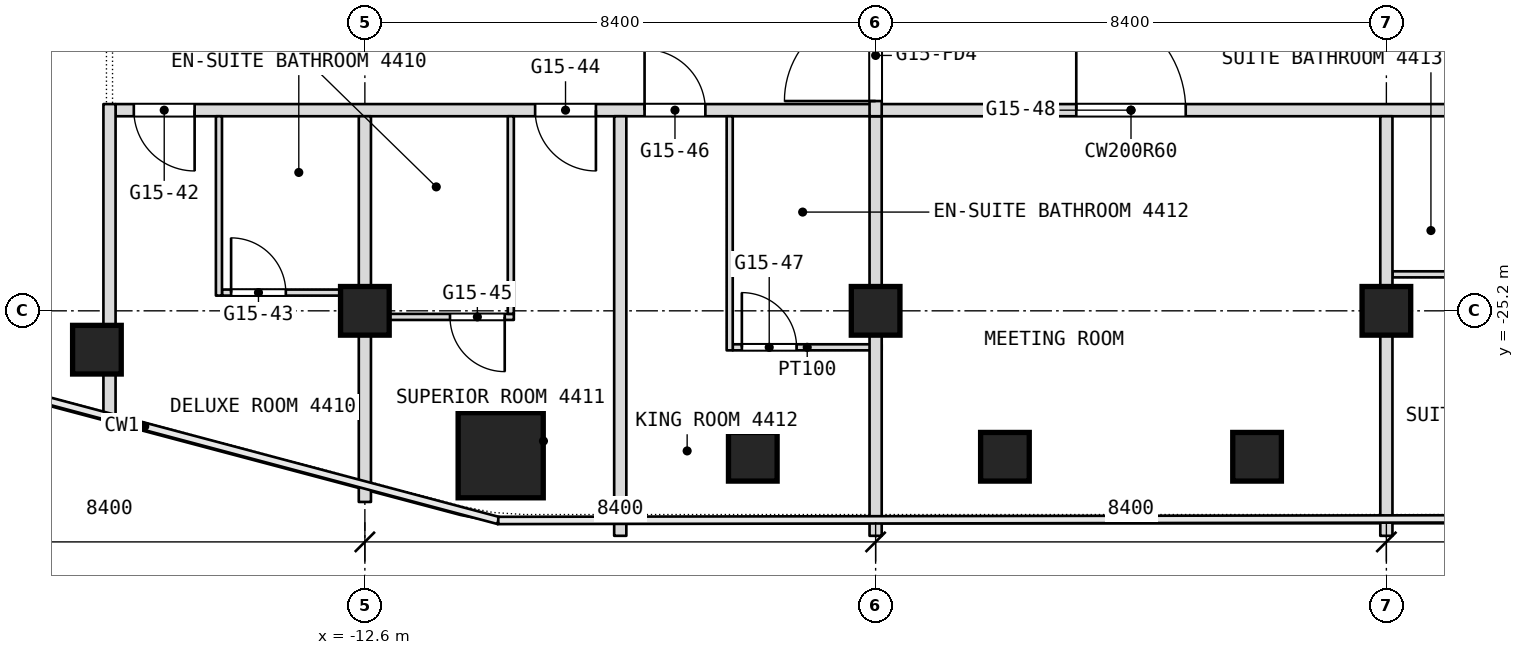
"""IFC4 building model, lengths in metres.
Left out: names, types, materials, properties, quantities, classifications, styles, units other than length and angle.
Written with IfcOpenShell. Run it as: python <this file> out.ifc"""

import sys

from ifc_helpers import new_model, si_unit, direction, frame, frame_2d, origin, origin_2d, place, context, subcontext, project, spatial, rectangle, extrude, element, fill, save


model = new_model("IFC4")
c1 = context("Model", 3, precision=1e-05, world=origin(), true_north=direction((0.0, 1.0)))
c2 = subcontext(c1, "Body", "Model", "MODEL_VIEW")
j1 = project(units=[si_unit("LENGTHUNIT", "METRE"), si_unit("PLANEANGLEUNIT", "RADIAN")], contexts=[c1])
p1 = place(None, origin())
s1 = spatial("IfcSite", under=j1, at=p1, CompositionType="ELEMENT")
p2 = place(p1, origin())
s2 = spatial("IfcBuilding", under=s1, at=p2, CompositionType="ELEMENT")
p3 = place(p2, frame((0.0, 0.0, 194.9)))
s3 = spatial("IfcBuildingStorey", under=s2, at=p3, CompositionType="ELEMENT", Elevation=194.9)
p4 = place(p3, frame((-10.366, -27.575, 0.0), z_axis=(0.0, 0.0, 1.0), x_axis=(1.0, 0.0, 0.0)))
e1 = element("IfcColumn", 1, at=p4, inside=s3, PredefinedType="COLUMN", context=c2, shape_type="SweptSolid", body=[
    extrude(rectangle(XDim=1.4, YDim=1.4, at=origin_2d()), origin(), (0.0, 0.0, 1.0), 3.6),
])
for number, where, z_axis, x_axis in (
    (2, (-12.6, -25.2, 0.0), (0.0, 0.0, 1.0), (1.0, 0.0, 0.0)),
    (3, (-4.2, -25.2, 0.0), (0.0, 0.0, 1.0), (1.0, 0.0, 0.0)),
    (4, (4.2, -25.2, 0.0), (0.0, 0.0, 1.0), (1.0, 0.0, 0.0)),
    (5, (2.073, -27.6, 0.0), (0.0, 0.0, 1.0), (1.0, 0.0, 0.0)),
    (6, (-2.073, -27.6, 0.0), (0.0, 0.0, 1.0), (1.0, 0.0, 0.0)),
    (7, (-6.22, -27.6, 0.0), (0.0, 0.0, 1.0), (1.0, 0.0, 0.0)),
    (8, (-17.007, -25.839, 0.0), (0.0, 0.0, 1.0), (1.0, 0.0, 0.0)),
):
    element("IfcColumn", number, at=place(p3, frame(where, z_axis=z_axis, x_axis=x_axis)), inside=s3, PredefinedType="COLUMN", context=c2, shape_type="SweptSolid", body=[
        extrude(rectangle(XDim=0.8, YDim=0.8, at=origin_2d()), origin(), (0.0, 0.0, 1.0), 3.6),
    ])
p5 = place(p3, frame((-6.55, -25.8, 0.0), z_axis=(0.0, 0.0, 1.0), x_axis=(1.0, 0.0, 0.0)))
e9 = element("IfcWall", 9, at=p5, inside=s3, PredefinedType="PARTITIONING", context=c2, shape_type="SweptSolid", body=[
    extrude(rectangle(XDim=2.45, YDim=0.1, at=frame_2d((1.225, 0.0))), origin(), (0.0, 0.0, 1.0), 3.34),
])
p6 = place(p5, frame((0.15, 0.0, 0.0)))
e10 = element("IfcOpeningElement", 10, at=p6, cuts=e9, PredefinedType="OPENING", context=c2, shape_type="SweptSolid", body=[
    extrude(rectangle(XDim=0.9, YDim=2.1, at=frame_2d((0.45, 1.05))), frame((0.0, 0.05, 0.0), z_axis=(0.0, -1.0, 0.0), x_axis=(1.0, 0.0, 0.0)), (0.0, 0.0, 1.0), 0.1),
])
p7 = place(p3, frame((-12.5, -25.3, 0.0), z_axis=(0.0, 0.0, 1.0), x_axis=(1.0, 0.0, 0.0)))
e11 = element("IfcWall", 11, at=p7, inside=s3, PredefinedType="PARTITIONING", context=c2, shape_type="SweptSolid", body=[
    extrude(rectangle(XDim=2.35, YDim=0.1, at=frame_2d((1.175, 0.0))), origin(), (0.0, 0.0, 1.0), 2.94),
])
p8 = place(p7, frame((1.3, 0.0, 0.0)))
e12 = element("IfcOpeningElement", 12, at=p8, cuts=e11, PredefinedType="OPENING", context=c2, shape_type="SweptSolid", body=[
    extrude(rectangle(XDim=0.9, YDim=2.1, at=frame_2d((0.45, 1.05))), frame((0.0, 0.05, 0.0), z_axis=(0.0, -1.0, 0.0), x_axis=(1.0, 0.0, 0.0)), (0.0, 0.0, 1.0), 0.1),
])
p9 = place(p3, frame((-14.95, -24.9, 0.0), z_axis=(0.0, 0.0, 1.0), x_axis=(1.0, 0.0, 0.0)))
e13 = element("IfcWall", 13, at=p9, inside=s3, PredefinedType="PARTITIONING", context=c2, shape_type="SweptSolid", body=[
    extrude(rectangle(XDim=2.45, YDim=0.1, at=frame_2d((1.225, 0.0))), origin(), (0.0, 0.0, 1.0), 3.34),
])
p10 = place(p9, frame((0.15, 0.0, 0.0)))
e14 = element("IfcOpeningElement", 14, at=p10, cuts=e13, PredefinedType="OPENING", context=c2, shape_type="SweptSolid", body=[
    extrude(rectangle(XDim=0.9, YDim=2.1, at=frame_2d((0.45, 1.05))), frame((0.0, 0.05, 0.0), z_axis=(0.0, -1.0, 0.0), x_axis=(1.0, 0.0, 0.0)), (0.0, 0.0, 1.0), 0.1),
])
p11 = place(p3, frame((4.3, -24.6, 0.0), z_axis=(0.0, 0.0, 1.0), x_axis=(1.0, 0.0, 0.0)))
e15 = element("IfcWall", 15, at=p11, inside=s3, PredefinedType="PARTITIONING", context=c2, shape_type="SweptSolid", body=[
    extrude(rectangle(XDim=2.35, YDim=0.1, at=frame_2d((1.175, 0.0))), origin(), (0.0, 0.0, 1.0), 3.34),
])
p12 = place(p3, frame((-16.7, -21.9, 0.0), z_axis=(0.0, 0.0, 1.0), x_axis=(1.0, 0.0, 0.0)))
e16 = element("IfcWall", 16, at=p12, inside=s3, PredefinedType="PARTITIONING", context=c2, shape_type="SweptSolid", body=[
    extrude(rectangle(XDim=33.4, YDim=0.2, at=frame_2d((16.7, 0.0))), origin(), (0.0, 0.0, 1.0), 3.34),
])
p13 = place(p12, frame((0.3, 0.0, 0.0)))
e17 = element("IfcOpeningElement", 17, at=p13, cuts=e16, PredefinedType="OPENING", context=c2, shape_type="SweptSolid", body=[
    extrude(rectangle(XDim=1.0, YDim=2.1, at=frame_2d((0.5, 1.05))), frame((0.0, 0.1, 0.0), z_axis=(0.0, -1.0, 0.0), x_axis=(1.0, 0.0, 0.0)), (0.0, 0.0, 1.0), 0.2),
])
p14 = place(p12, frame((6.9, 0.0, 0.0)))
e18 = element("IfcOpeningElement", 18, at=p14, cuts=e16, PredefinedType="OPENING", context=c2, shape_type="SweptSolid", body=[
    extrude(rectangle(XDim=1.0, YDim=2.1, at=frame_2d((0.5, 1.05))), frame((0.0, 0.1, 0.0), z_axis=(0.0, -1.0, 0.0), x_axis=(1.0, 0.0, 0.0)), (0.0, 0.0, 1.0), 0.2),
])
p15 = place(p12, frame((8.7, 0.0, 0.0)))
e19 = element("IfcOpeningElement", 19, at=p15, cuts=e16, PredefinedType="OPENING", context=c2, shape_type="SweptSolid", body=[
    extrude(rectangle(XDim=1.0, YDim=2.1, at=frame_2d((0.5, 1.05))), frame((0.0, 0.1, 0.0), z_axis=(0.0, -1.0, 0.0), x_axis=(1.0, 0.0, 0.0)), (0.0, 0.0, 1.0), 0.2),
])
p16 = place(p12, frame((15.8, 0.0, 0.0)))
e20 = element("IfcOpeningElement", 20, at=p16, cuts=e16, PredefinedType="OPENING", context=c2, shape_type="SweptSolid", body=[
    extrude(rectangle(XDim=1.8, YDim=2.1, at=frame_2d((0.9, 1.05))), frame((0.0, 0.1, 0.0), z_axis=(0.0, -1.0, 0.0), x_axis=(1.0, 0.0, 0.0)), (0.0, 0.0, 1.0), 0.2),
])
p17 = place(p12, frame((26.65, 0.0, 0.0)))
e21 = element("IfcOpeningElement", 21, at=p17, cuts=e16, PredefinedType="OPENING", context=c2, shape_type="SweptSolid", body=[
    extrude(rectangle(XDim=1.1, YDim=2.1, at=frame_2d((0.55, 1.05))), frame((0.0, 0.1, 0.0), z_axis=(0.0, -1.0, 0.0), x_axis=(1.0, 0.0, 0.0)), (0.0, 0.0, 1.0), 0.2),
])
p18 = place(p12, frame((29.7, 0.0, 0.0)))
e22 = element("IfcOpeningElement", 22, at=p18, cuts=e16, PredefinedType="OPENING", context=c2, shape_type="SweptSolid", body=[
    extrude(rectangle(XDim=1.0, YDim=2.1, at=frame_2d((0.5, 1.05))), frame((0.0, 0.1, 0.0), z_axis=(0.0, -1.0, 0.0), x_axis=(1.0, 0.0, 0.0)), (0.0, 0.0, 1.0), 0.2),
])
for number, where, z_axis, x_axis in (
    (23, (4.2, -28.9, 0.0), (0.0, 0.0, 1.0), (0.0, 1.0, 0.0)),
    (24, (-4.2, -28.9, 0.0), (0.0, 0.0, 1.0), (0.0, 1.0, 0.0)),
):
    element("IfcWall", number, at=place(p3, frame(where, z_axis=z_axis, x_axis=x_axis)), inside=s3, PredefinedType="PARTITIONING", context=c2, shape_type="SweptSolid", body=[
        extrude(rectangle(XDim=6.9, YDim=0.2, at=frame_2d((3.45, 0.0))), origin(), (0.0, 0.0, 1.0), 3.34),
    ])
p19 = place(p3, frame((-4.2, -22.0, 0.0), z_axis=(0.0, 0.0, 1.0), x_axis=(0.0, 1.0, 0.0)))
e25 = element("IfcWall", 25, at=p19, inside=s3, PredefinedType="PARTITIONING", context=c2, shape_type="SweptSolid", body=[
    extrude(rectangle(XDim=8.4, YDim=0.2, at=frame_2d((4.2, 0.0))), origin(), (0.0, 0.0, 1.0), 3.34),
])
p20 = place(p19, frame((0.25, 0.0, 0.0)))
e26 = element("IfcOpeningElement", 26, at=p20, cuts=e25, PredefinedType="OPENING", context=c2, shape_type="SweptSolid", body=[
    extrude(rectangle(XDim=1.5, YDim=2.1, at=frame_2d((0.75, 1.05))), frame((0.0, 0.1, 0.0), z_axis=(0.0, -1.0, 0.0), x_axis=(1.0, 0.0, 0.0)), (0.0, 0.0, 1.0), 0.2),
])
p21 = place(p3, frame((-6.6, -25.85, 0.0), z_axis=(0.0, 0.0, 1.0), x_axis=(0.0, 1.0, 0.0)))
e27 = element("IfcWall", 27, at=p21, inside=s3, PredefinedType="PARTITIONING", context=c2, shape_type="SweptSolid", body=[
    extrude(rectangle(XDim=3.85, YDim=0.1, at=frame_2d((1.925, 0.0))), origin(), (0.0, 0.0, 1.0), 3.34),
])
p22 = place(p3, frame((-8.4, -28.9, 0.0), z_axis=(0.0, 0.0, 1.0), x_axis=(0.0, 1.0, 0.0)))
e28 = element("IfcWall", 28, at=p22, inside=s3, PredefinedType="PARTITIONING", context=c2, shape_type="SweptSolid", body=[
    extrude(rectangle(XDim=6.9, YDim=0.2, at=frame_2d((3.45, 0.0))), origin(), (0.0, 0.0, 1.0), 3.34),
])
p23 = place(p3, frame((-10.2, -25.25, 0.0), z_axis=(0.0, 0.0, 1.0), x_axis=(0.0, 1.0, 0.0)))
e29 = element("IfcWall", 29, at=p23, inside=s3, PredefinedType="PARTITIONING", context=c2, shape_type="SweptSolid", body=[
    extrude(rectangle(XDim=3.25, YDim=0.1, at=frame_2d((1.625, 0.0))), origin(), (0.0, 0.0, 1.0), 3.34),
])
p24 = place(p3, frame((-12.6, -28.343, 0.0), z_axis=(0.0, 0.0, 1.0), x_axis=(0.0, 1.0, 0.0)))
e30 = element("IfcWall", 30, at=p24, inside=s3, PredefinedType="PARTITIONING", context=c2, shape_type="SweptSolid", body=[
    extrude(rectangle(XDim=6.343, YDim=0.2, at=frame_2d((3.171, 0.0))), origin(), (0.0, 0.0, 1.0), 3.34),
])
p25 = place(p3, frame((-15.0, -24.95, 0.0), z_axis=(0.0, 0.0, 1.0), x_axis=(0.0, 1.0, 0.0)))
e31 = element("IfcWall", 31, at=p25, inside=s3, PredefinedType="PARTITIONING", context=c2, shape_type="SweptSolid", body=[
    extrude(rectangle(XDim=2.95, YDim=0.1, at=frame_2d((1.475, 0.0))), origin(), (0.0, 0.0, 1.0), 3.34),
])
p26 = place(p3, frame((-16.8, -27.229, 0.0), z_axis=(0.0, 0.0, 1.0), x_axis=(0.0, 1.0, 0.0)))
e32 = element("IfcWall", 32, at=p26, inside=s3, PredefinedType="PARTITIONING", context=c2, shape_type="SweptSolid", body=[
    extrude(rectangle(XDim=5.429, YDim=0.2, at=frame_2d((2.714, 0.0))), origin(), (0.0, 0.0, 1.0), 3.34),
])
p27 = place(p6, origin())
e33 = element("IfcDoor", 33, at=p27, inside=s3, OperationType="SINGLE_SWING_LEFT", PredefinedType="DOOR", context=c2, shape_type="SweptSolid", body=[
    extrude(rectangle(XDim=0.9, YDim=2.1, at=frame_2d((0.45, 1.05))), frame((0.0, 0.025, 0.0), z_axis=(0.0, -1.0, 0.0), x_axis=(1.0, 0.0, 0.0)), (0.0, 0.0, 1.0), 0.05),
])
fill(e10, e33)
p28 = place(p8, origin())
e34 = element("IfcDoor", 34, at=p28, inside=s3, OperationType="SINGLE_SWING_RIGHT", PredefinedType="DOOR", context=c2, shape_type="SweptSolid", body=[
    extrude(rectangle(XDim=0.9, YDim=2.1, at=frame_2d((0.45, 1.05))), frame((0.0, 0.025, 0.0), z_axis=(0.0, -1.0, 0.0), x_axis=(1.0, 0.0, 0.0)), (0.0, 0.0, 1.0), 0.05),
])
fill(e12, e34)
p29 = place(p10, origin())
e35 = element("IfcDoor", 35, at=p29, inside=s3, OperationType="SINGLE_SWING_LEFT", PredefinedType="DOOR", context=c2, shape_type="SweptSolid", body=[
    extrude(rectangle(XDim=0.9, YDim=2.1, at=frame_2d((0.45, 1.05))), frame((0.0, 0.025, 0.0), z_axis=(0.0, -1.0, 0.0), x_axis=(1.0, 0.0, 0.0)), (0.0, 0.0, 1.0), 0.05),
])
fill(e14, e35)
p30 = place(p13, origin())
e36 = element("IfcDoor", 36, at=p30, inside=s3, OperationType="SINGLE_SWING_RIGHT", PredefinedType="DOOR", context=c2, shape_type="SweptSolid", body=[
    extrude(rectangle(XDim=1.0, YDim=2.1, at=frame_2d((0.5, 1.05))), frame((0.0, 0.025, 0.0), z_axis=(0.0, -1.0, 0.0), x_axis=(1.0, 0.0, 0.0)), (0.0, 0.0, 1.0), 0.05),
])
fill(e17, e36)
p31 = place(p14, origin())
e37 = element("IfcDoor", 37, at=p31, inside=s3, OperationType="SINGLE_SWING_RIGHT", PredefinedType="DOOR", context=c2, shape_type="SweptSolid", body=[
    extrude(rectangle(XDim=1.0, YDim=2.1, at=frame_2d((0.5, 1.05))), frame((0.0, 0.025, 0.0), z_axis=(0.0, -1.0, 0.0), x_axis=(1.0, 0.0, 0.0)), (0.0, 0.0, 1.0), 0.05),
])
fill(e18, e37)
p32 = place(p15, origin())
e38 = element("IfcDoor", 38, at=p32, inside=s3, OperationType="SINGLE_SWING_RIGHT", PredefinedType="DOOR", context=c2, shape_type="SweptSolid", body=[
    extrude(rectangle(XDim=1.0, YDim=2.1, at=frame_2d((0.5, 1.05))), frame((0.0, 0.025, 0.0), z_axis=(0.0, -1.0, 0.0), x_axis=(1.0, 0.0, 0.0)), (0.0, 0.0, 1.0), 0.05),
])
fill(e19, e38)
p33 = place(p16, origin())
e39 = element("IfcDoor", 39, at=p33, inside=s3, OperationType="DOUBLE_DOOR_SINGLE_SWING", PredefinedType="DOOR", context=c2, shape_type="SweptSolid", body=[
    extrude(rectangle(XDim=1.8, YDim=2.1, at=frame_2d((0.9, 1.05))), frame((0.0, 0.025, 0.0), z_axis=(0.0, -1.0, 0.0), x_axis=(1.0, 0.0, 0.0)), (0.0, 0.0, 1.0), 0.05),
])
fill(e20, e39)
p34 = place(p20, origin())
e40 = element("IfcDoor", 40, at=p34, inside=s3, OperationType="DOUBLE_DOOR_DOUBLE_SWING", PredefinedType="DOOR", context=c2, shape_type="SweptSolid", body=[
    extrude(rectangle(XDim=1.5, YDim=2.1, at=frame_2d((0.75, 1.05))), frame((0.0, 0.025, 0.0), z_axis=(0.0, -1.0, 0.0), x_axis=(1.0, 0.0, 0.0)), (0.0, 0.0, 1.0), 0.05),
])
fill(e26, e40)
save(model, sys.argv[1])
